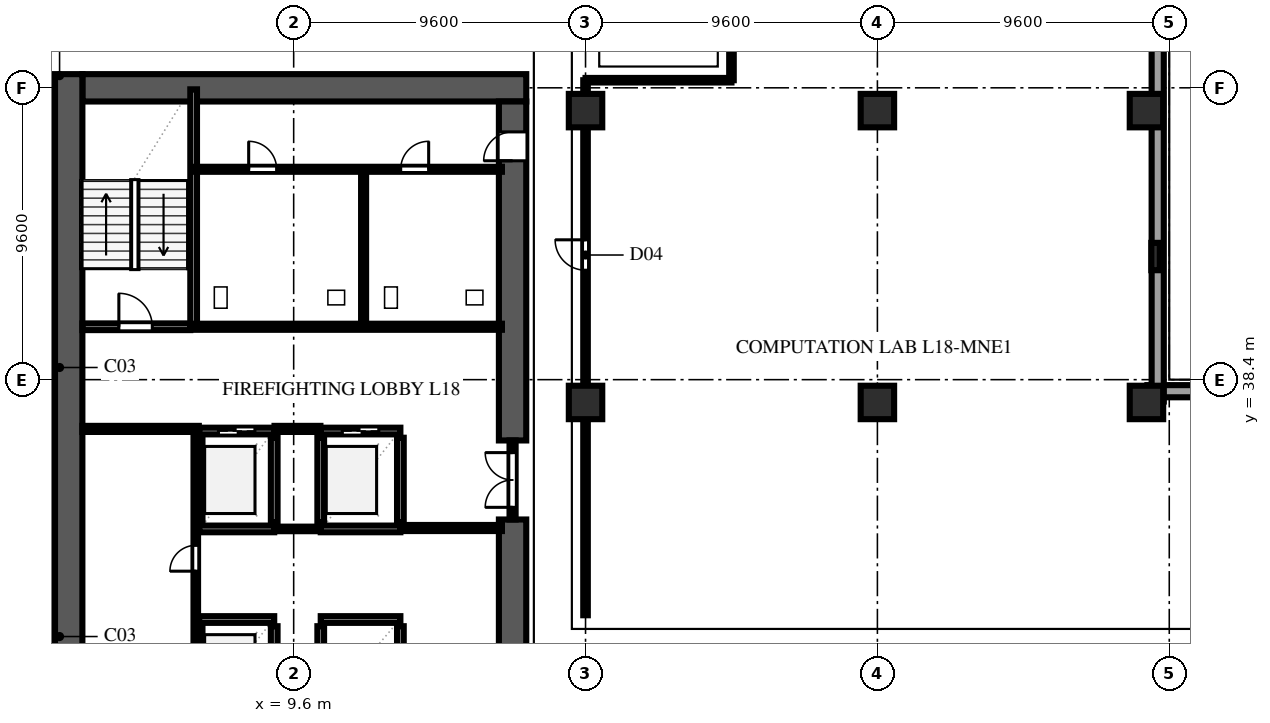
"""IFC4 building model, lengths in metres.
Left out: names, types, materials, properties, quantities, classifications, styles, units other than length and angle.
Written with IfcOpenShell. Run it as: python <this file> out.ifc"""

import sys

from ifc_helpers import new_model, si_unit, direction, frame, frame_2d, origin, origin_2d, place, context, subcontext, project, spatial, rectangle, extrude, element, fill, save


model = new_model("IFC4")
c1 = context("Model", 3, precision=1e-05, world=origin(), true_north=direction((0.0, 1.0)))
c2 = subcontext(c1, "Body", "Model", "MODEL_VIEW")
j1 = project(units=[si_unit("LENGTHUNIT", "METRE"), si_unit("PLANEANGLEUNIT", "RADIAN")], contexts=[c1])
p1 = place(None, origin())
s1 = spatial("IfcSite", under=j1, at=p1, CompositionType="ELEMENT")
p2 = place(p1, origin())
s2 = spatial("IfcBuilding", under=s1, at=p2, CompositionType="ELEMENT")
p3 = place(p2, frame((0.0, 0.0, 73.6)))
s3 = spatial("IfcBuildingStorey", under=s2, at=p3, CompositionType="ELEMENT", Elevation=73.6)
p4 = place(p3, frame((2.65, 48.0, 0.0), z_axis=(0.0, 0.0, 1.0), x_axis=(1.0, 0.0, 0.0)))
e1 = element("IfcWall", 1, at=p4, inside=s3, PredefinedType="SHEAR", context=c2, shape_type="SweptSolid", body=[
    extrude(rectangle(XDim=14.6, YDim=0.9, at=frame_2d((7.3, 0.0))), origin(), (0.0, 0.0, 1.0), 3.54),
])
p5 = place(p3, frame((2.2, 9.15, 0.0), z_axis=(0.0, 0.0, 1.0), x_axis=(0.0, 1.0, 0.0)))
e2 = element("IfcWall", 2, at=p5, inside=s3, PredefinedType="SHEAR", context=c2, shape_type="SweptSolid", body=[
    extrude(rectangle(XDim=39.3, YDim=0.9, at=frame_2d((19.65, 0.0))), origin(), (0.0, 0.0, 1.0), 3.54),
])
p6 = place(p3, frame((16.8, 26.0, 0.0), z_axis=(0.0, 0.0, 1.0), x_axis=(0.0, 1.0, 0.0)))
e3 = element("IfcWall", 3, at=p6, inside=s3, PredefinedType="SHEAR", context=c2, shape_type="SweptSolid", body=[
    extrude(rectangle(XDim=7.8, YDim=0.9, at=frame_2d((3.9, 0.0))), origin(), (0.0, 0.0, 1.0), 3.54),
])
p7 = place(p3, frame((16.8, 36.4, 0.0), z_axis=(0.0, 0.0, 1.0), x_axis=(0.0, 1.0, 0.0)))
e4 = element("IfcWall", 4, at=p7, inside=s3, PredefinedType="SHEAR", context=c2, shape_type="SweptSolid", body=[
    extrude(rectangle(XDim=11.15, YDim=0.9, at=frame_2d((5.575, 0.0))), origin(), (0.0, 0.0, 1.0), 3.54),
])
p8 = place(p7, frame((9.2, 0.0, 0.0)))
e5 = element("IfcOpeningElement", 5, at=p8, cuts=e4, PredefinedType="OPENING", context=c2, shape_type="SweptSolid", body=[
    extrude(rectangle(XDim=0.95, YDim=2.15, at=frame_2d((0.475, 1.075))), frame((0.0, 0.462, 0.0), z_axis=(0.0, -1.0, 0.0), x_axis=(1.0, 0.0, 0.0)), (0.0, 0.0, 1.0), 0.924),
])
for number, where, z_axis, x_axis in (
    (6, (19.2, 37.65, 0.0), (0.0, 0.0, 1.0), (1.0, 0.0, 0.0)),
    (7, (19.2, 47.25, 0.0), (0.0, 0.0, 1.0), (1.0, 0.0, 0.0)),
    (8, (28.8, 37.65, 0.0), (0.0, 0.0, 1.0), (1.0, 0.0, 0.0)),
    (9, (28.8, 47.25, 0.0), (0.0, 0.0, 1.0), (1.0, 0.0, 0.0)),
    (10, (37.65, 37.65, 0.0), (0.0, 0.0, 1.0), (1.0, 0.0, 0.0)),
    (11, (37.65, 47.25, 0.0), (0.0, 0.0, 1.0), (1.0, 0.0, 0.0)),
):
    element("IfcColumn", number, at=place(p3, frame(where, z_axis=z_axis, x_axis=x_axis)), inside=s3, PredefinedType="COLUMN", context=c2, shape_type="SweptSolid", body=[
        extrude(rectangle(XDim=1.1, YDim=1.1, at=origin_2d()), origin(), (0.0, 0.0, 1.0), 3.8),
    ])
p9 = place(p3, frame((37.95, 42.45, 0.0), z_axis=(0.0, 0.0, 1.0), x_axis=(0.0, 1.0, 0.0)))
e12 = element("IfcColumn", 12, at=p9, inside=s3, PredefinedType="PILASTER", context=c2, shape_type="SweptSolid", body=[
    extrude(rectangle(XDim=0.9, YDim=0.28, at=origin_2d()), origin(), (0.0, 0.0, 1.0), 3.8),
])
for number, where, z_axis, x_axis in (
    (13, (65.36, 38.02, 0.0), (0.0, 0.0, 1.0), (-1.0, 0.0, 0.0)),
    (14, (38.02, 37.68, 0.0), (0.0, 0.0, 1.0), (0.0, 1.0, 0.0)),
):
    element("IfcWall", number, at=place(p3, frame(where, z_axis=z_axis, x_axis=x_axis)), inside=s3, PredefinedType="SOLIDWALL", context=c2, shape_type="SweptSolid", body=[
        extrude(rectangle(XDim=27.68, YDim=0.4, at=frame_2d((13.84, 0.0))), origin(), (0.0, 0.0, 1.0), 3.54),
    ])
p10 = place(p3, frame((2.65, 40.14, 0.0), z_axis=(0.0, 0.0, 1.0), x_axis=(1.0, 0.0, 0.0)))
e15 = element("IfcWall", 15, at=p10, inside=s3, PredefinedType="SOLIDWALL", context=c2, shape_type="SweptSolid", body=[
    extrude(rectangle(XDim=3.55, YDim=0.22, at=frame_2d((1.775, 0.0))), origin(), (0.0, 0.0, 1.0), 3.54),
])
p11 = place(p10, frame((1.2, 0.0, 0.0)))
e16 = element("IfcOpeningElement", 16, at=p11, cuts=e15, PredefinedType="OPENING", context=c2, shape_type="SweptSolid", body=[
    extrude(rectangle(XDim=1.1, YDim=2.2, at=frame_2d((0.55, 1.1))), frame((0.0, 0.122, 0.0), z_axis=(0.0, -1.0, 0.0), x_axis=(1.0, 0.0, 0.0)), (0.0, 0.0, 1.0), 0.244),
])
p12 = place(p3, frame((6.31, 40.14, 0.0), z_axis=(0.0, 0.0, 1.0), x_axis=(0.0, 1.0, 0.0)))
e17 = element("IfcWall", 17, at=p12, inside=s3, PredefinedType="SOLIDWALL", context=c2, shape_type="SweptSolid", body=[
    extrude(rectangle(XDim=7.81, YDim=0.22, at=frame_2d((3.905, 0.0))), origin(), (0.0, 0.0, 1.0), 3.54),
])
p13 = place(p3, frame((6.49, 27.71, 0.0), z_axis=(0.0, 0.0, 1.0), x_axis=(0.0, 1.0, 0.0)))
e18 = element("IfcWall", 18, at=p13, inside=s3, PredefinedType="SOLIDWALL", context=c2, shape_type="SweptSolid", body=[
    extrude(rectangle(XDim=2.58, YDim=0.22, at=frame_2d((1.29, 0.0))), origin(), (0.0, 0.0, 1.0), 3.54),
])
p14 = place(p3, frame((8.96, 27.71, 0.0), z_axis=(0.0, 0.0, 1.0), x_axis=(0.0, 1.0, 0.0)))
e19 = element("IfcWall", 19, at=p14, inside=s3, PredefinedType="SOLIDWALL", context=c2, shape_type="SweptSolid", body=[
    extrude(rectangle(XDim=2.58, YDim=0.22, at=frame_2d((1.29, 0.0))), origin(), (0.0, 0.0, 1.0), 3.54),
])
p15 = place(p14, frame((0.74, 0.0, 0.0)))
e20 = element("IfcOpeningElement", 20, at=p15, cuts=e19, PredefinedType="OPENING", context=c2, shape_type="SweptSolid", body=[
    extrude(rectangle(XDim=1.1, YDim=2.2, at=frame_2d((0.55, 1.1))), frame((0.0, 0.122, 0.0), z_axis=(0.0, -1.0, 0.0), x_axis=(1.0, 0.0, 0.0)), (0.0, 0.0, 1.0), 0.244),
])
p16 = place(p3, frame((6.49, 30.51, 0.0), z_axis=(0.0, 0.0, 1.0), x_axis=(1.0, 0.0, 0.0)))
e21 = element("IfcWall", 21, at=p16, inside=s3, PredefinedType="SOLIDWALL", context=c2, shape_type="SweptSolid", body=[
    extrude(rectangle(XDim=2.47, YDim=0.22, at=frame_2d((1.235, 0.0))), origin(), (0.0, 0.0, 1.0), 3.54),
])
for number, where, z_axis, x_axis in (
    (22, (10.49, 27.71, 0.0), (0.0, 0.0, 1.0), (0.0, 1.0, 0.0)),
    (23, (13.11, 27.71, 0.0), (0.0, 0.0, 1.0), (0.0, 1.0, 0.0)),
):
    element("IfcWall", number, at=place(p3, frame(where, z_axis=z_axis, x_axis=x_axis)), inside=s3, PredefinedType="SOLIDWALL", context=c2, shape_type="SweptSolid", body=[
        extrude(rectangle(XDim=2.58, YDim=0.22, at=frame_2d((1.29, 0.0))), origin(), (0.0, 0.0, 1.0), 3.54),
    ])
p17 = place(p3, frame((10.49, 30.51, 0.0), z_axis=(0.0, 0.0, 1.0), x_axis=(1.0, 0.0, 0.0)))
e24 = element("IfcWall", 24, at=p17, inside=s3, PredefinedType="SOLIDWALL", context=c2, shape_type="SweptSolid", body=[
    extrude(rectangle(XDim=2.62, YDim=0.22, at=frame_2d((1.31, 0.0))), origin(), (0.0, 0.0, 1.0), 3.54),
])
for number, where, z_axis, x_axis in (
    (25, (6.49, 33.71, 0.0), (0.0, 0.0, 1.0), (0.0, 1.0, 0.0)),
    (26, (8.96, 33.71, 0.0), (0.0, 0.0, 1.0), (0.0, 1.0, 0.0)),
):
    element("IfcWall", number, at=place(p3, frame(where, z_axis=z_axis, x_axis=x_axis)), inside=s3, PredefinedType="SOLIDWALL", context=c2, shape_type="SweptSolid", body=[
        extrude(rectangle(XDim=2.78, YDim=0.22, at=frame_2d((1.39, 0.0))), origin(), (0.0, 0.0, 1.0), 3.54),
    ])
p18 = place(p3, frame((6.49, 33.49, 0.0), z_axis=(0.0, 0.0, 1.0), x_axis=(1.0, 0.0, 0.0)))
e27 = element("IfcWall", 27, at=p18, inside=s3, PredefinedType="SOLIDWALL", context=c2, shape_type="SweptSolid", body=[
    extrude(rectangle(XDim=2.47, YDim=0.22, at=frame_2d((1.235, 0.0))), origin(), (0.0, 0.0, 1.0), 3.54),
])
p19 = place(p3, frame((6.49, 36.71, 0.0), z_axis=(0.0, 0.0, 1.0), x_axis=(1.0, 0.0, 0.0)))
e28 = element("IfcWall", 28, at=p19, inside=s3, PredefinedType="SOLIDWALL", context=c2, shape_type="SweptSolid", body=[
    extrude(rectangle(XDim=2.47, YDim=0.22, at=frame_2d((1.235, 0.0))), origin(), (0.0, 0.0, 1.0), 3.54),
])
p20 = place(p19, frame((0.635, 0.0, 0.0)))
e29 = element("IfcOpeningElement", 29, at=p20, cuts=e28, PredefinedType="OPENING", context=c2, shape_type="SweptSolid", body=[
    extrude(rectangle(XDim=1.2, YDim=2.2, at=frame_2d((0.6, 1.1))), frame((0.0, 0.122, 0.0), z_axis=(0.0, -1.0, 0.0), x_axis=(1.0, 0.0, 0.0)), (0.0, 0.0, 1.0), 0.244),
])
for number, where, z_axis, x_axis in (
    (30, (10.49, 33.71, 0.0), (0.0, 0.0, 1.0), (0.0, 1.0, 0.0)),
    (31, (13.11, 33.71, 0.0), (0.0, 0.0, 1.0), (0.0, 1.0, 0.0)),
):
    element("IfcWall", number, at=place(p3, frame(where, z_axis=z_axis, x_axis=x_axis)), inside=s3, PredefinedType="SOLIDWALL", context=c2, shape_type="SweptSolid", body=[
        extrude(rectangle(XDim=2.78, YDim=0.22, at=frame_2d((1.39, 0.0))), origin(), (0.0, 0.0, 1.0), 3.54),
    ])
p21 = place(p3, frame((10.49, 33.49, 0.0), z_axis=(0.0, 0.0, 1.0), x_axis=(1.0, 0.0, 0.0)))
e32 = element("IfcWall", 32, at=p21, inside=s3, PredefinedType="SOLIDWALL", context=c2, shape_type="SweptSolid", body=[
    extrude(rectangle(XDim=2.62, YDim=0.22, at=frame_2d((1.31, 0.0))), origin(), (0.0, 0.0, 1.0), 3.54),
])
p22 = place(p3, frame((10.49, 36.71, 0.0), z_axis=(0.0, 0.0, 1.0), x_axis=(1.0, 0.0, 0.0)))
e33 = element("IfcWall", 33, at=p22, inside=s3, PredefinedType="SOLIDWALL", context=c2, shape_type="SweptSolid", body=[
    extrude(rectangle(XDim=2.62, YDim=0.22, at=frame_2d((1.31, 0.0))), origin(), (0.0, 0.0, 1.0), 3.54),
])
p23 = place(p22, frame((0.71, 0.0, 0.0)))
e34 = element("IfcOpeningElement", 34, at=p23, cuts=e33, PredefinedType="OPENING", context=c2, shape_type="SweptSolid", body=[
    extrude(rectangle(XDim=1.2, YDim=2.2, at=frame_2d((0.6, 1.1))), frame((0.0, 0.122, 0.0), z_axis=(0.0, -1.0, 0.0), x_axis=(1.0, 0.0, 0.0)), (0.0, 0.0, 1.0), 0.244),
])
p24 = place(p3, frame((2.65, 36.78, 0.0), z_axis=(0.0, 0.0, 1.0), x_axis=(1.0, 0.0, 0.0)))
e35 = element("IfcWall", 35, at=p24, inside=s3, PredefinedType="SOLIDWALL", context=c2, shape_type="SweptSolid", body=[
    extrude(rectangle(XDim=3.83, YDim=0.2, at=frame_2d((1.915, 0.0))), origin(), (0.0, 0.0, 1.0), 3.54),
])
p25 = place(p3, frame((8.97, 36.78, 0.0), z_axis=(0.0, 0.0, 1.0), x_axis=(1.0, 0.0, 0.0)))
e36 = element("IfcWall", 36, at=p25, inside=s3, PredefinedType="SOLIDWALL", context=c2, shape_type="SweptSolid", body=[
    extrude(rectangle(XDim=1.51, YDim=0.2, at=frame_2d((0.755, 0.0))), origin(), (0.0, 0.0, 1.0), 3.54),
])
p26 = place(p3, frame((13.12, 33.52, 0.0), z_axis=(0.0, 0.0, 1.0), x_axis=(1.0, 0.0, 0.0)))
e37 = element("IfcWall", 37, at=p26, inside=s3, PredefinedType="SOLIDWALL", context=c2, shape_type="SweptSolid", body=[
    extrude(rectangle(XDim=3.33, YDim=0.2, at=frame_2d((1.665, 0.0))), origin(), (0.0, 0.0, 1.0), 3.54),
])
p27 = place(p3, frame((6.32, 40.14, 0.0), z_axis=(0.0, 0.0, 1.0), x_axis=(1.0, 0.0, 0.0)))
e38 = element("IfcWall", 38, at=p27, inside=s3, PredefinedType="SOLIDWALL", context=c2, shape_type="SweptSolid", body=[
    extrude(rectangle(XDim=10.13, YDim=0.2, at=frame_2d((5.065, 0.0))), origin(), (0.0, 0.0, 1.0), 3.54),
])
p28 = place(p3, frame((16.8, 33.8, 0.0), z_axis=(0.0, 0.0, 1.0), x_axis=(0.0, 1.0, 0.0)))
e39 = element("IfcWall", 39, at=p28, inside=s3, PredefinedType="SOLIDWALL", context=c2, shape_type="SweptSolid", body=[
    extrude(rectangle(XDim=2.6, YDim=0.2, at=frame_2d((1.3, 0.0))), origin(), (0.0, 0.0, 1.0), 3.54),
])
p29 = place(p28, frame((0.4, 0.0, 0.0)))
e40 = element("IfcOpeningElement", 40, at=p29, cuts=e39, PredefinedType="OPENING", context=c2, shape_type="SweptSolid", body=[
    extrude(rectangle(XDim=1.8, YDim=2.2, at=frame_2d((0.9, 1.1))), frame((0.0, 0.112, 0.0), z_axis=(0.0, -1.0, 0.0), x_axis=(1.0, 0.0, 0.0)), (0.0, 0.0, 1.0), 0.224),
])
p30 = place(p3, frame((8.965, 33.49, 0.0), z_axis=(0.0, 0.0, 1.0), x_axis=(1.0, 0.0, 0.0)))
e41 = element("IfcWall", 41, at=p30, inside=s3, PredefinedType="PARTITIONING", context=c2, shape_type="SweptSolid", body=[
    extrude(rectangle(XDim=1.52, YDim=0.15, at=frame_2d((0.76, 0.0))), origin(), (0.0, 0.0, 1.0), 3.54),
])
p31 = place(p3, frame((6.38, 17.8, 0.0), z_axis=(0.0, 0.0, 1.0), x_axis=(0.0, 1.0, 0.0)))
e42 = element("IfcWall", 42, at=p31, inside=s3, PredefinedType="PARTITIONING", context=c2, shape_type="SweptSolid", body=[
    extrude(rectangle(XDim=18.98, YDim=0.15, at=frame_2d((9.49, 0.0))), origin(), (0.0, 0.0, 1.0), 3.54),
])
p32 = place(p31, frame((14.3, 0.0, 0.0)))
e43 = element("IfcOpeningElement", 43, at=p32, cuts=e42, PredefinedType="OPENING", context=c2, shape_type="SweptSolid", body=[
    extrude(rectangle(XDim=0.85, YDim=2.1, at=frame_2d((0.425, 1.05))), frame((0.0, 0.087, 0.0), z_axis=(0.0, -1.0, 0.0), x_axis=(1.0, 0.0, 0.0)), (0.0, 0.0, 1.0), 0.174),
])
p33 = place(p3, frame((6.32, 45.32, 0.0), z_axis=(0.0, 0.0, 1.0), x_axis=(1.0, 0.0, 0.0)))
e44 = element("IfcWall", 44, at=p33, inside=s3, PredefinedType="PLUMBINGWALL", context=c2, shape_type="SweptSolid", body=[
    extrude(rectangle(XDim=10.13, YDim=0.165, at=frame_2d((5.065, 0.0))), origin(), (0.0, 0.0, 1.0), 3.54),
])
p34 = place(p33, frame((1.8, 0.0, 0.0)))
e45 = element("IfcOpeningElement", 45, at=p34, cuts=e44, PredefinedType="OPENING", context=c2, shape_type="SweptSolid", body=[
    extrude(rectangle(XDim=0.92, YDim=2.15, at=frame_2d((0.46, 1.075))), frame((0.0, 0.094, 0.0), z_axis=(0.0, -1.0, 0.0), x_axis=(1.0, 0.0, 0.0)), (0.0, 0.0, 1.0), 0.189),
])
p35 = place(p33, frame((6.8, 0.0, 0.0)))
e46 = element("IfcOpeningElement", 46, at=p35, cuts=e44, PredefinedType="OPENING", context=c2, shape_type="SweptSolid", body=[
    extrude(rectangle(XDim=0.92, YDim=2.15, at=frame_2d((0.46, 1.075))), frame((0.0, 0.094, 0.0), z_axis=(0.0, -1.0, 0.0), x_axis=(1.0, 0.0, 0.0)), (0.0, 0.0, 1.0), 0.189),
])
p36 = place(p3, frame((11.9, 40.4, 0.0), z_axis=(0.0, 0.0, 1.0), x_axis=(0.0, 1.0, 0.0)))
e47 = element("IfcWall", 47, at=p36, inside=s3, PredefinedType="PLUMBINGWALL", context=c2, shape_type="SweptSolid", body=[
    extrude(rectangle(XDim=4.92, YDim=0.165, at=frame_2d((2.46, 0.0))), origin(), (0.0, 0.0, 1.0), 3.54),
])
p37 = place(p3, frame((0.85, 48.0, 0.0), z_axis=(0.0, 0.0, 1.0), x_axis=(1.0, 0.0, 0.0)))
e48 = element("IfcWall", 48, at=p37, inside=s3, PredefinedType="SOLIDWALL", context=c2, shape_type="SweptSolid", body=[
    extrude(rectangle(XDim=0.895, YDim=0.2, at=frame_2d((0.448, 0.0))), origin(), (0.0, 0.0, 1.0), 3.54),
])
p38 = place(p3, frame((19.2, 30.65, 0.0), z_axis=(0.0, 0.0, 1.0), x_axis=(0.0, 1.0, 0.0)))
e49 = element("IfcWall", 49, at=p38, inside=s3, PredefinedType="PARTITIONING", context=c2, shape_type="SweptSolid", body=[
    extrude(rectangle(XDim=17.6, YDim=0.15, at=frame_2d((8.8, 0.0))), origin(), (0.0, 0.0, 1.0), 2.996),
])
p39 = place(p38, frame((11.35, 0.0, 0.0)))
e50 = element("IfcOpeningElement", 50, at=p39, cuts=e49, PredefinedType="OPENING", context=c2, shape_type="SweptSolid", body=[
    extrude(rectangle(XDim=1.0, YDim=2.2, at=frame_2d((0.5, 1.1))), frame((0.0, 0.087, 0.0), z_axis=(0.0, -1.0, 0.0), x_axis=(1.0, 0.0, 0.0)), (0.0, 0.0, 1.0), 0.174),
])
p40 = place(p3, frame((19.2, 48.25, 0.0), z_axis=(0.0, 0.0, 1.0), x_axis=(1.0, 0.0, 0.0)))
e51 = element("IfcWall", 51, at=p40, inside=s3, PredefinedType="PARTITIONING", context=c2, shape_type="SweptSolid", body=[
    extrude(rectangle(XDim=4.8, YDim=0.15, at=frame_2d((2.4, 0.0))), origin(), (0.0, 0.0, 1.0), 3.54),
])
p41 = place(p3, frame((24.0, 48.25, 0.0), z_axis=(0.0, 0.0, 1.0), x_axis=(0.0, 1.0, 0.0)))
e52 = element("IfcWall", 52, at=p41, inside=s3, PredefinedType="PARTITIONING", context=c2, shape_type="SweptSolid", body=[
    extrude(rectangle(XDim=18.094, YDim=0.15, at=frame_2d((9.047, 0.0))), origin(), (0.0, 0.0, 1.0), 3.007),
])
p42 = place(p41, frame((3.4, 0.0, 0.0)))
e53 = element("IfcOpeningElement", 53, at=p42, cuts=e52, PredefinedType="OPENING", context=c2, shape_type="SweptSolid", body=[
    extrude(rectangle(XDim=0.95, YDim=2.15, at=frame_2d((0.475, 1.075))), frame((0.0, 0.087, 0.0), z_axis=(0.0, -1.0, 0.0), x_axis=(1.0, 0.0, 0.0)), (0.0, 0.0, 1.0), 0.174),
])
p43 = place(p11, origin())
e54 = element("IfcDoor", 54, at=p43, inside=s3, OperationType="SINGLE_SWING_LEFT", PredefinedType="DOOR", context=c2, shape_type="SweptSolid", body=[
    extrude(rectangle(XDim=1.1, YDim=2.2, at=frame_2d((0.55, 1.1))), frame((0.0, 0.025, 0.0), z_axis=(0.0, -1.0, 0.0), x_axis=(1.0, 0.0, 0.0)), (0.0, 0.0, 1.0), 0.05),
])
fill(e16, e54)
p44 = place(p20, origin())
e55 = element("IfcDoor", 55, at=p44, inside=s3, OperationType="DOUBLE_DOOR_SLIDING", PredefinedType="DOOR", context=c2, shape_type="SweptSolid", body=[
    extrude(rectangle(XDim=1.2, YDim=2.2, at=frame_2d((0.6, 1.1))), frame((0.0, 0.025, 0.0), z_axis=(0.0, -1.0, 0.0), x_axis=(1.0, 0.0, 0.0)), (0.0, 0.0, 1.0), 0.05),
])
fill(e29, e55)
p45 = place(p23, origin())
e56 = element("IfcDoor", 56, at=p45, inside=s3, OperationType="DOUBLE_DOOR_SLIDING", PredefinedType="DOOR", context=c2, shape_type="SweptSolid", body=[
    extrude(rectangle(XDim=1.2, YDim=2.2, at=frame_2d((0.6, 1.1))), frame((0.0, 0.025, 0.0), z_axis=(0.0, -1.0, 0.0), x_axis=(1.0, 0.0, 0.0)), (0.0, 0.0, 1.0), 0.05),
])
fill(e34, e56)
p46 = place(p8, origin())
e57 = element("IfcDoor", 57, at=p46, inside=s3, OperationType="SINGLE_SWING_LEFT", PredefinedType="DOOR", context=c2, shape_type="SweptSolid", body=[
    extrude(rectangle(XDim=0.95, YDim=2.15, at=frame_2d((0.475, 1.075))), frame((0.0, 0.025, 0.0), z_axis=(0.0, -1.0, 0.0), x_axis=(1.0, 0.0, 0.0)), (0.0, 0.0, 1.0), 0.05),
])
fill(e5, e57)
p47 = place(p29, origin())
e58 = element("IfcDoor", 58, at=p47, inside=s3, OperationType="DOUBLE_DOOR_SINGLE_SWING", PredefinedType="DOOR", context=c2, shape_type="SweptSolid", body=[
    extrude(rectangle(XDim=1.8, YDim=2.2, at=frame_2d((0.9, 1.1))), frame((0.0, 0.025, 0.0), z_axis=(0.0, -1.0, 0.0), x_axis=(1.0, 0.0, 0.0)), (0.0, 0.0, 1.0), 0.05),
])
fill(e40, e58)
p48 = place(p32, origin())
e59 = element("IfcDoor", 59, at=p48, inside=s3, OperationType="SINGLE_SWING_LEFT", PredefinedType="DOOR", context=c2, shape_type="SweptSolid", body=[
    extrude(rectangle(XDim=0.85, YDim=2.1, at=frame_2d((0.425, 1.05))), frame((0.0, 0.025, 0.0), z_axis=(0.0, -1.0, 0.0), x_axis=(1.0, 0.0, 0.0)), (0.0, 0.0, 1.0), 0.05),
])
fill(e43, e59)
p49 = place(p34, origin())
e60 = element("IfcDoor", 60, at=p49, inside=s3, OperationType="SINGLE_SWING_LEFT", PredefinedType="DOOR", context=c2, shape_type="SweptSolid", body=[
    extrude(rectangle(XDim=0.92, YDim=2.15, at=frame_2d((0.46, 1.075))), frame((0.0, 0.025, 0.0), z_axis=(0.0, -1.0, 0.0), x_axis=(1.0, 0.0, 0.0)), (0.0, 0.0, 1.0), 0.05),
])
fill(e45, e60)
p50 = place(p35, origin())
e61 = element("IfcDoor", 61, at=p50, inside=s3, OperationType="SINGLE_SWING_RIGHT", PredefinedType="DOOR", context=c2, shape_type="SweptSolid", body=[
    extrude(rectangle(XDim=0.92, YDim=2.15, at=frame_2d((0.46, 1.075))), frame((0.0, 0.025, 0.0), z_axis=(0.0, -1.0, 0.0), x_axis=(1.0, 0.0, 0.0)), (0.0, 0.0, 1.0), 0.05),
])
fill(e46, e61)
p51 = place(p39, origin())
e62 = element("IfcDoor", 62, at=p51, inside=s3, OperationType="SINGLE_SWING_RIGHT", PredefinedType="DOOR", context=c2, shape_type="SweptSolid", body=[
    extrude(rectangle(XDim=1.0, YDim=2.2, at=frame_2d((0.5, 1.1))), frame((0.0, 0.025, 0.0), z_axis=(0.0, -1.0, 0.0), x_axis=(1.0, 0.0, 0.0)), (0.0, 0.0, 1.0), 0.05),
])
fill(e50, e62)
save(model, sys.argv[1])
